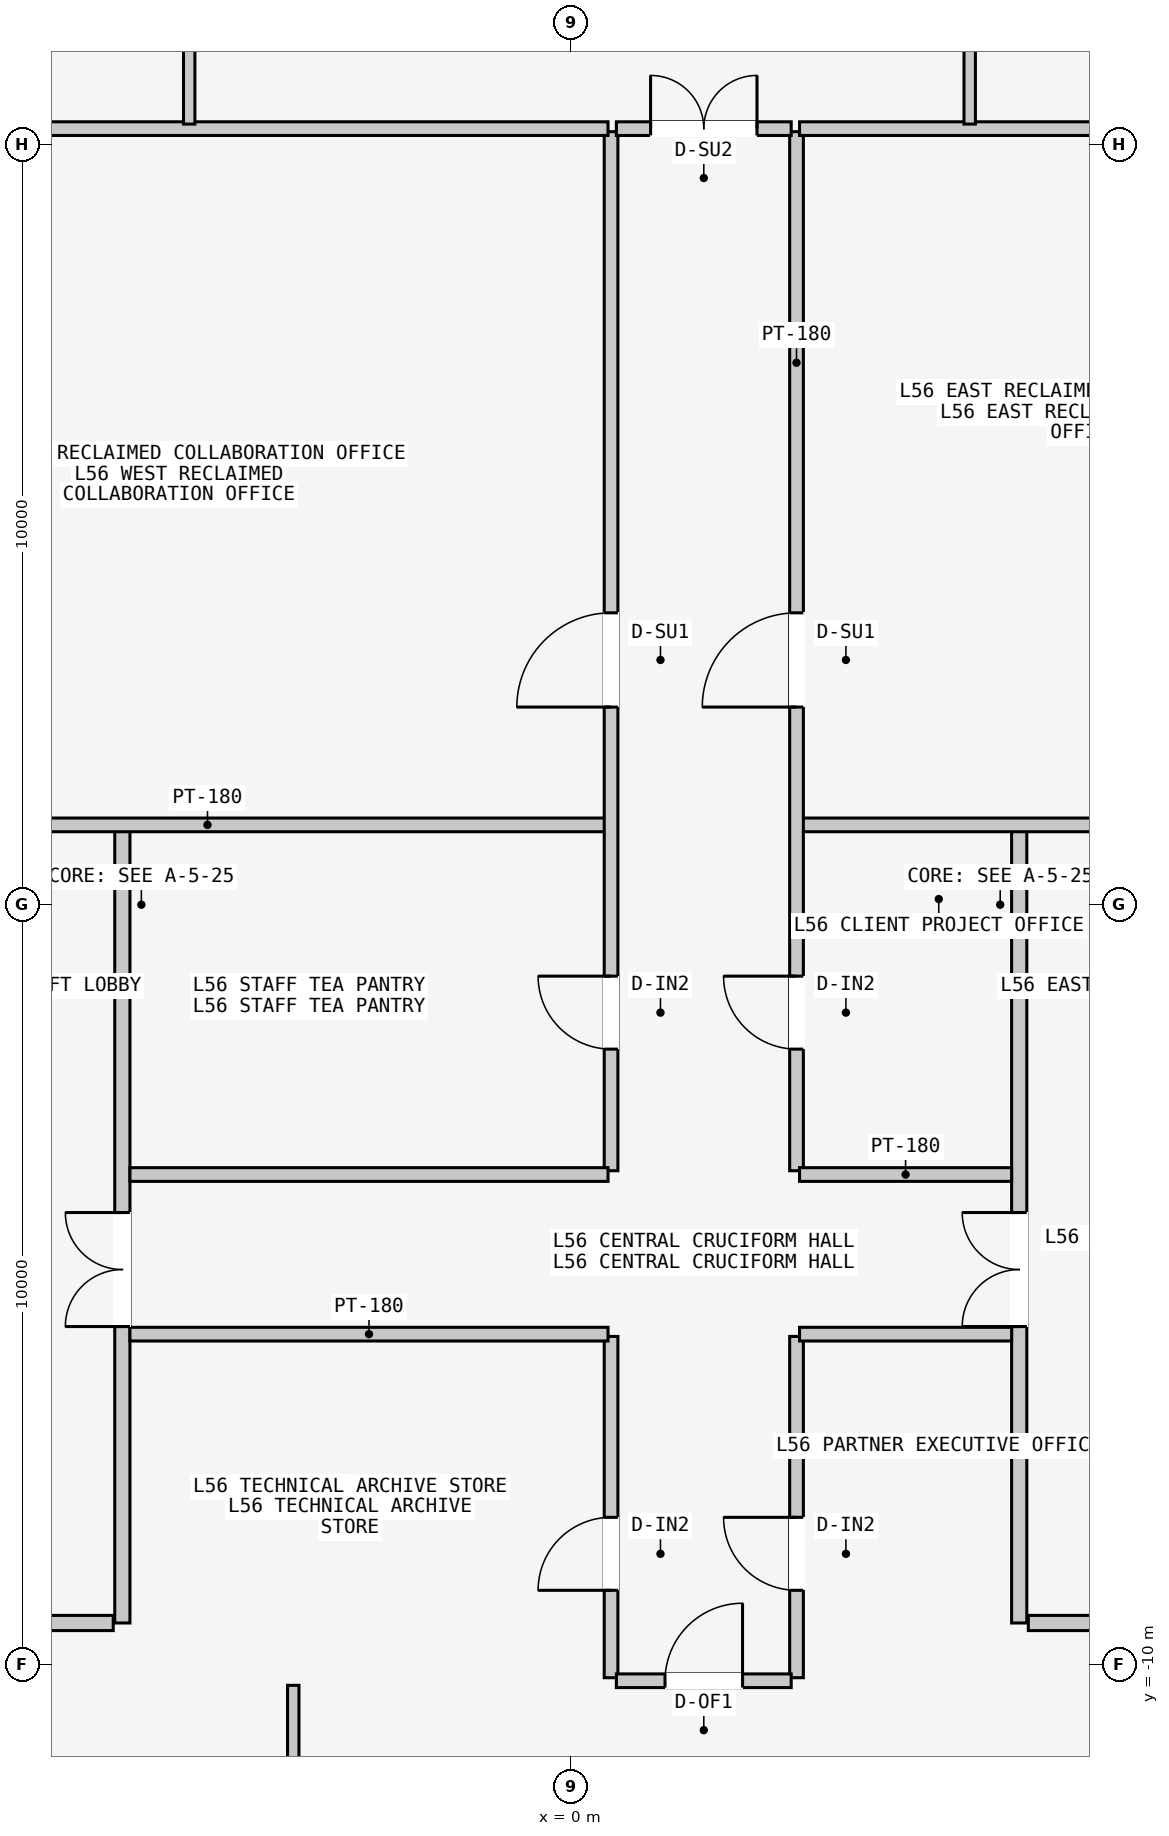
"""IFC4 building model, lengths in metres.
Left out: names, types, materials, properties, quantities, classifications, styles, units other than length and angle.
Written with IfcOpenShell. Run it as: python <this file> out.ifc"""

import sys

from ifc_helpers import new_model, si_unit, direction, frame, frame_2d, origin, place, context, subcontext, project, spatial, rectangle, extrude, element, fill, save


model = new_model("IFC4")
c1 = context("Model", 3, precision=1e-05, world=origin(), true_north=direction((0.0, 1.0)))
c2 = subcontext(c1, "Body", "Model", "MODEL_VIEW")
j1 = project(units=[si_unit("LENGTHUNIT", "METRE"), si_unit("PLANEANGLEUNIT", "RADIAN")], contexts=[c1])
p1 = place(None, origin())
s1 = spatial("IfcSite", under=j1, at=p1, CompositionType="ELEMENT")
p2 = place(p1, origin())
s2 = spatial("IfcBuilding", under=s1, at=p2, CompositionType="ELEMENT")
p3 = place(p2, frame((0.0, 0.0, 213.9)))
s3 = spatial("IfcBuildingStorey", under=s2, at=p3, CompositionType="ELEMENT", Elevation=213.9)
p4 = place(p3, frame((-5.9, -9.45, 0.0), z_axis=(0.0, 0.0, 1.0), x_axis=(0.0, 1.0, 0.0)))
e1 = element("IfcWall", 1, at=p4, inside=s3, PredefinedType="PARTITIONING", context=c2, shape_type="SweptSolid", body=[
    extrude(rectangle(XDim=10.5, YDim=0.2, at=frame_2d((5.25, 0.0))), origin(), (0.0, 0.0, 1.0), 4.3),
])
p5 = place(p4, frame((3.9, 0.0, 0.0)))
e2 = element("IfcOpeningElement", 2, at=p5, cuts=e1, PredefinedType="OPENING", context=c2, shape_type="SweptSolid", body=[
    extrude(rectangle(XDim=1.5, YDim=2.2, at=frame_2d((0.75, 1.1))), frame((0.0, 0.11, 0.0), z_axis=(0.0, -1.0, 0.0), x_axis=(1.0, 0.0, 0.0)), (0.0, 0.0, 1.0), 0.22),
])
p6 = place(p3, frame((-6.02, -9.45, 0.0), z_axis=(0.0, 0.0, 1.0), x_axis=(-1.0, 0.0, 0.0)))
e3 = element("IfcWall", 3, at=p6, inside=s3, PredefinedType="PARTITIONING", context=c2, shape_type="SweptSolid", body=[
    extrude(rectangle(XDim=1.8, YDim=0.2, at=frame_2d((0.9, 0.0))), origin(), (0.0, 0.0, 1.0), 4.3),
])
p7 = place(p3, frame((5.9, -9.45, 0.0), z_axis=(0.0, 0.0, 1.0), x_axis=(0.0, 1.0, 0.0)))
e4 = element("IfcWall", 4, at=p7, inside=s3, PredefinedType="PARTITIONING", context=c2, shape_type="SweptSolid", body=[
    extrude(rectangle(XDim=10.5, YDim=0.2, at=frame_2d((5.25, 0.0))), origin(), (0.0, 0.0, 1.0), 4.3),
])
p8 = place(p7, frame((3.9, 0.0, 0.0)))
e5 = element("IfcOpeningElement", 5, at=p8, cuts=e4, PredefinedType="OPENING", context=c2, shape_type="SweptSolid", body=[
    extrude(rectangle(XDim=1.5, YDim=2.2, at=frame_2d((0.75, 1.1))), frame((0.0, 0.11, 0.0), z_axis=(0.0, -1.0, 0.0), x_axis=(1.0, 0.0, 0.0)), (0.0, 0.0, 1.0), 0.22),
])
p9 = place(p3, frame((6.02, -9.45, 0.0), z_axis=(0.0, 0.0, 1.0), x_axis=(1.0, 0.0, 0.0)))
e6 = element("IfcWall", 6, at=p9, inside=s3, PredefinedType="PARTITIONING", context=c2, shape_type="SweptSolid", body=[
    extrude(rectangle(XDim=1.8, YDim=0.2, at=frame_2d((0.9, 0.0))), origin(), (0.0, 0.0, 1.0), 4.3),
])
p10 = place(p3, frame((-10.05, 1.05, 0.0), z_axis=(0.0, 0.0, 1.0), x_axis=(1.0, 0.0, 0.0)))
e7 = element("IfcWall", 7, at=p10, inside=s3, PredefinedType="PARTITIONING", context=c2, shape_type="SweptSolid", body=[
    extrude(rectangle(XDim=10.54, YDim=0.18, at=frame_2d((5.27, 0.0))), origin(), (0.0, 0.0, 1.0), 4.3),
])
p11 = place(p3, frame((0.53, -3.5, 0.0), z_axis=(0.0, 0.0, 1.0), x_axis=(0.0, 1.0, 0.0)))
e8 = element("IfcWall", 8, at=p11, inside=s3, PredefinedType="PARTITIONING", context=c2, shape_type="SweptSolid", body=[
    extrude(rectangle(XDim=13.67, YDim=0.18, at=frame_2d((6.835, 0.0))), origin(), (0.0, 0.0, 1.0), 4.3),
])
p12 = place(p11, frame((6.1, 0.0, 0.0)))
e9 = element("IfcOpeningElement", 9, at=p12, cuts=e8, PredefinedType="OPENING", context=c2, shape_type="SweptSolid", body=[
    extrude(rectangle(XDim=1.24, YDim=2.24, at=frame_2d((0.62, 1.12))), frame((0.0, 0.1, 0.0), z_axis=(0.0, -1.0, 0.0), x_axis=(1.0, 0.0, 0.0)), (0.0, 0.0, 1.0), 0.2),
])
p13 = place(p11, frame((1.6, 0.0, 0.0)))
e10 = element("IfcOpeningElement", 10, at=p13, cuts=e8, PredefinedType="OPENING", context=c2, shape_type="SweptSolid", body=[
    extrude(rectangle(XDim=0.96, YDim=2.18, at=frame_2d((0.48, 1.09))), frame((0.0, 0.1, 0.0), z_axis=(0.0, -1.0, 0.0), x_axis=(1.0, 0.0, 0.0)), (0.0, 0.0, 1.0), 0.2),
])
p14 = place(p3, frame((-7.5, 10.21, 0.0), z_axis=(0.0, 0.0, 1.0), x_axis=(1.0, 0.0, 0.0)))
e11 = element("IfcWall", 11, at=p14, inside=s3, PredefinedType="PARTITIONING", context=c2, shape_type="SweptSolid", body=[
    extrude(rectangle(XDim=7.99, YDim=0.18, at=frame_2d((3.995, 0.0))), origin(), (0.0, 0.0, 1.0), 4.3),
])
p15 = place(p3, frame((-5.8, -3.55, 0.0), z_axis=(0.0, 0.0, 1.0), x_axis=(1.0, 0.0, 0.0)))
e12 = element("IfcWall", 12, at=p15, inside=s3, PredefinedType="PARTITIONING", context=c2, shape_type="SweptSolid", body=[
    extrude(rectangle(XDim=6.29, YDim=0.18, at=frame_2d((3.145, 0.0))), origin(), (0.0, 0.0, 1.0), 4.3),
])
p16 = place(p3, frame((3.01, 1.05, 0.0), z_axis=(0.0, 0.0, 1.0), x_axis=(1.0, 0.0, 0.0)))
e13 = element("IfcWall", 13, at=p16, inside=s3, PredefinedType="PARTITIONING", context=c2, shape_type="SweptSolid", body=[
    extrude(rectangle(XDim=7.05, YDim=0.18, at=frame_2d((3.525, 0.0))), origin(), (0.0, 0.0, 1.0), 4.3),
])
p17 = place(p3, frame((2.97, -3.5, 0.0), z_axis=(0.0, 0.0, 1.0), x_axis=(0.0, 1.0, 0.0)))
e14 = element("IfcWall", 14, at=p17, inside=s3, PredefinedType="PARTITIONING", context=c2, shape_type="SweptSolid", body=[
    extrude(rectangle(XDim=13.67, YDim=0.18, at=frame_2d((6.835, 0.0))), origin(), (0.0, 0.0, 1.0), 4.3),
])
p18 = place(p17, frame((6.1, 0.0, 0.0)))
e15 = element("IfcOpeningElement", 15, at=p18, cuts=e14, PredefinedType="OPENING", context=c2, shape_type="SweptSolid", body=[
    extrude(rectangle(XDim=1.24, YDim=2.24, at=frame_2d((0.62, 1.12))), frame((0.0, 0.1, 0.0), z_axis=(0.0, -1.0, 0.0), x_axis=(1.0, 0.0, 0.0)), (0.0, 0.0, 1.0), 0.2),
])
p19 = place(p17, frame((1.6, 0.0, 0.0)))
e16 = element("IfcOpeningElement", 16, at=p19, cuts=e14, PredefinedType="OPENING", context=c2, shape_type="SweptSolid", body=[
    extrude(rectangle(XDim=0.96, YDim=2.18, at=frame_2d((0.48, 1.09))), frame((0.0, 0.1, 0.0), z_axis=(0.0, -1.0, 0.0), x_axis=(1.0, 0.0, 0.0)), (0.0, 0.0, 1.0), 0.2),
])
p20 = place(p3, frame((3.01, 10.21, 0.0), z_axis=(0.0, 0.0, 1.0), x_axis=(1.0, 0.0, 0.0)))
e17 = element("IfcWall", 17, at=p20, inside=s3, PredefinedType="PARTITIONING", context=c2, shape_type="SweptSolid", body=[
    extrude(rectangle(XDim=4.49, YDim=0.18, at=frame_2d((2.245, 0.0))), origin(), (0.0, 0.0, 1.0), 4.3),
])
p21 = place(p3, frame((3.01, -3.55, 0.0), z_axis=(0.0, 0.0, 1.0), x_axis=(1.0, 0.0, 0.0)))
e18 = element("IfcWall", 18, at=p21, inside=s3, PredefinedType="PARTITIONING", context=c2, shape_type="SweptSolid", body=[
    extrude(rectangle(XDim=2.79, YDim=0.18, at=frame_2d((1.395, 0.0))), origin(), (0.0, 0.0, 1.0), 4.3),
])
p22 = place(p3, frame((0.53, -10.17, 0.0), z_axis=(0.0, 0.0, 1.0), x_axis=(0.0, 1.0, 0.0)))
e19 = element("IfcWall", 19, at=p22, inside=s3, PredefinedType="PARTITIONING", context=c2, shape_type="SweptSolid", body=[
    extrude(rectangle(XDim=4.49, YDim=0.18, at=frame_2d((2.245, 0.0))), origin(), (0.0, 0.0, 1.0), 4.3),
])
p23 = place(p22, frame((1.15, 0.0, 0.0)))
e20 = element("IfcOpeningElement", 20, at=p23, cuts=e19, PredefinedType="OPENING", context=c2, shape_type="SweptSolid", body=[
    extrude(rectangle(XDim=0.96, YDim=2.18, at=frame_2d((0.48, 1.09))), frame((0.0, 0.1, 0.0), z_axis=(0.0, -1.0, 0.0), x_axis=(1.0, 0.0, 0.0)), (0.0, 0.0, 1.0), 0.2),
])
p24 = place(p3, frame((2.97, -10.17, 0.0), z_axis=(0.0, 0.0, 1.0), x_axis=(0.0, 1.0, 0.0)))
e21 = element("IfcWall", 21, at=p24, inside=s3, PredefinedType="PARTITIONING", context=c2, shape_type="SweptSolid", body=[
    extrude(rectangle(XDim=4.49, YDim=0.18, at=frame_2d((2.245, 0.0))), origin(), (0.0, 0.0, 1.0), 4.3),
])
p25 = place(p24, frame((1.15, 0.0, 0.0)))
e22 = element("IfcOpeningElement", 22, at=p25, cuts=e21, PredefinedType="OPENING", context=c2, shape_type="SweptSolid", body=[
    extrude(rectangle(XDim=0.96, YDim=2.18, at=frame_2d((0.48, 1.09))), frame((0.0, 0.1, 0.0), z_axis=(0.0, -1.0, 0.0), x_axis=(1.0, 0.0, 0.0)), (0.0, 0.0, 1.0), 0.2),
])
p26 = place(p3, frame((-5.8, -5.65, 0.0), z_axis=(0.0, 0.0, 1.0), x_axis=(1.0, 0.0, 0.0)))
e23 = element("IfcWall", 23, at=p26, inside=s3, PredefinedType="PARTITIONING", context=c2, shape_type="SweptSolid", body=[
    extrude(rectangle(XDim=6.29, YDim=0.18, at=frame_2d((3.145, 0.0))), origin(), (0.0, 0.0, 1.0), 4.3),
])
p27 = place(p3, frame((3.01, -5.65, 0.0), z_axis=(0.0, 0.0, 1.0), x_axis=(1.0, 0.0, 0.0)))
e24 = element("IfcWall", 24, at=p27, inside=s3, PredefinedType="PARTITIONING", context=c2, shape_type="SweptSolid", body=[
    extrude(rectangle(XDim=2.79, YDim=0.18, at=frame_2d((1.395, 0.0))), origin(), (0.0, 0.0, 1.0), 4.3),
])
p28 = place(p3, frame((-5.021, 10.27, 0.0), z_axis=(0.0, 0.0, 1.0), x_axis=(0.0, 1.0, 0.0)))
e25 = element("IfcWall", 25, at=p28, inside=s3, PredefinedType="PARTITIONING", context=c2, shape_type="SweptSolid", body=[
    extrude(rectangle(XDim=7.29, YDim=0.15, at=frame_2d((3.645, 0.0))), origin(), (0.0, 0.0, 1.0), 4.3),
])
p29 = place(p28, frame((1.15, 0.0, 0.0)))
e26 = element("IfcOpeningElement", 26, at=p29, cuts=e25, PredefinedType="OPENING", context=c2, shape_type="SweptSolid", body=[
    extrude(rectangle(XDim=0.96, YDim=2.18, at=frame_2d((0.48, 1.09))), frame((0.0, 0.085, 0.0), z_axis=(0.0, -1.0, 0.0), x_axis=(1.0, 0.0, 0.0)), (0.0, 0.0, 1.0), 0.17),
])
p30 = place(p3, frame((5.249, 10.27, 0.0), z_axis=(0.0, 0.0, 1.0), x_axis=(0.0, 1.0, 0.0)))
e27 = element("IfcWall", 27, at=p30, inside=s3, PredefinedType="PARTITIONING", context=c2, shape_type="SweptSolid", body=[
    extrude(rectangle(XDim=7.29, YDim=0.15, at=frame_2d((3.645, 0.0))), origin(), (0.0, 0.0, 1.0), 4.3),
])
p31 = place(p30, frame((1.15, 0.0, 0.0)))
e28 = element("IfcOpeningElement", 28, at=p31, cuts=e27, PredefinedType="OPENING", context=c2, shape_type="SweptSolid", body=[
    extrude(rectangle(XDim=0.96, YDim=2.18, at=frame_2d((0.48, 1.09))), frame((0.0, 0.085, 0.0), z_axis=(0.0, -1.0, 0.0), x_axis=(1.0, 0.0, 0.0)), (0.0, 0.0, 1.0), 0.17),
])
p32 = place(p3, frame((0.6, 10.21, 0.0), z_axis=(0.0, 0.0, 1.0), x_axis=(1.0, 0.0, 0.0)))
e29 = element("IfcWall", 29, at=p32, inside=s3, PredefinedType="PARTITIONING", context=c2, shape_type="SweptSolid", body=[
    extrude(rectangle(XDim=2.3, YDim=0.18, at=frame_2d((1.15, 0.0))), origin(), (0.0, 0.0, 1.0), 4.3),
])
p33 = place(p32, frame((0.45, 0.0, 0.0)))
e30 = element("IfcOpeningElement", 30, at=p33, cuts=e29, PredefinedType="OPENING", context=c2, shape_type="SweptSolid", body=[
    extrude(rectangle(XDim=1.4, YDim=2.2, at=frame_2d((0.7, 1.1))), frame((0.0, 0.1, 0.0), z_axis=(0.0, -1.0, 0.0), x_axis=(1.0, 0.0, 0.0)), (0.0, 0.0, 1.0), 0.2),
])
p34 = place(p3, frame((-3.651, -17.56, 0.0), z_axis=(0.0, 0.0, 1.0), x_axis=(0.0, 1.0, 0.0)))
e31 = element("IfcWall", 31, at=p34, inside=s3, PredefinedType="PARTITIONING", context=c2, shape_type="SweptSolid", body=[
    extrude(rectangle(XDim=7.29, YDim=0.15, at=frame_2d((3.645, 0.0))), origin(), (0.0, 0.0, 1.0), 4.3),
])
p35 = place(p34, frame((1.05, 0.0, 0.0)))
e32 = element("IfcOpeningElement", 32, at=p35, cuts=e31, PredefinedType="OPENING", context=c2, shape_type="SweptSolid", body=[
    extrude(rectangle(XDim=0.96, YDim=2.18, at=frame_2d((0.48, 1.09))), frame((0.0, 0.085, 0.0), z_axis=(0.0, -1.0, 0.0), x_axis=(1.0, 0.0, 0.0)), (0.0, 0.0, 1.0), 0.17),
])
p36 = place(p3, frame((0.6, -10.21, 0.0), z_axis=(0.0, 0.0, 1.0), x_axis=(1.0, 0.0, 0.0)))
e33 = element("IfcWall", 33, at=p36, inside=s3, PredefinedType="PARTITIONING", context=c2, shape_type="SweptSolid", body=[
    extrude(rectangle(XDim=2.3, YDim=0.18, at=frame_2d((1.15, 0.0))), origin(), (0.0, 0.0, 1.0), 4.3),
])
p37 = place(p36, frame((0.64, 0.0, 0.0)))
e34 = element("IfcOpeningElement", 34, at=p37, cuts=e33, PredefinedType="OPENING", context=c2, shape_type="SweptSolid", body=[
    extrude(rectangle(XDim=1.02, YDim=2.2, at=frame_2d((0.51, 1.1))), frame((0.0, 0.1, 0.0), z_axis=(0.0, -1.0, 0.0), x_axis=(1.0, 0.0, 0.0)), (0.0, 0.0, 1.0), 0.2),
])
p38 = place(p5, origin())
e35 = element("IfcDoor", 35, at=p38, inside=s3, OperationType="DOUBLE_DOOR_SINGLE_SWING", PredefinedType="DOOR", context=c2, shape_type="SweptSolid", body=[
    extrude(rectangle(XDim=1.5, YDim=2.2, at=frame_2d((0.75, 1.1))), frame((0.0, 0.025, 0.0), z_axis=(0.0, -1.0, 0.0), x_axis=(1.0, 0.0, 0.0)), (0.0, 0.0, 1.0), 0.05),
])
fill(e2, e35)
p39 = place(p8, origin())
e36 = element("IfcDoor", 36, at=p39, inside=s3, OperationType="DOUBLE_DOOR_SINGLE_SWING", PredefinedType="DOOR", context=c2, shape_type="SweptSolid", body=[
    extrude(rectangle(XDim=1.5, YDim=2.2, at=frame_2d((0.75, 1.1))), frame((0.0, 0.025, 0.0), z_axis=(0.0, -1.0, 0.0), x_axis=(1.0, 0.0, 0.0)), (0.0, 0.0, 1.0), 0.05),
])
fill(e5, e36)
p40 = place(p12, origin())
e37 = element("IfcDoor", 37, at=p40, inside=s3, OperationType="SINGLE_SWING_LEFT", PredefinedType="DOOR", context=c2, shape_type="SweptSolid", body=[
    extrude(rectangle(XDim=1.24, YDim=2.24, at=frame_2d((0.62, 1.12))), frame((0.0, 0.025, 0.0), z_axis=(0.0, -1.0, 0.0), x_axis=(1.0, 0.0, 0.0)), (0.0, 0.0, 1.0), 0.05),
])
fill(e9, e37)
p41 = place(p13, origin())
e38 = element("IfcDoor", 38, at=p41, inside=s3, OperationType="SINGLE_SWING_RIGHT", PredefinedType="DOOR", context=c2, shape_type="SweptSolid", body=[
    extrude(rectangle(XDim=0.96, YDim=2.18, at=frame_2d((0.48, 1.09))), frame((0.0, 0.025, 0.0), z_axis=(0.0, -1.0, 0.0), x_axis=(1.0, 0.0, 0.0)), (0.0, 0.0, 1.0), 0.05),
])
fill(e10, e38)
p42 = place(p18, origin())
e39 = element("IfcDoor", 39, at=p42, inside=s3, OperationType="SINGLE_SWING_LEFT", PredefinedType="DOOR", context=c2, shape_type="SweptSolid", body=[
    extrude(rectangle(XDim=1.24, YDim=2.24, at=frame_2d((0.62, 1.12))), frame((0.0, 0.025, 0.0), z_axis=(0.0, -1.0, 0.0), x_axis=(1.0, 0.0, 0.0)), (0.0, 0.0, 1.0), 0.05),
])
fill(e15, e39)
p43 = place(p19, origin())
e40 = element("IfcDoor", 40, at=p43, inside=s3, OperationType="SINGLE_SWING_RIGHT", PredefinedType="DOOR", context=c2, shape_type="SweptSolid", body=[
    extrude(rectangle(XDim=0.96, YDim=2.18, at=frame_2d((0.48, 1.09))), frame((0.0, 0.025, 0.0), z_axis=(0.0, -1.0, 0.0), x_axis=(1.0, 0.0, 0.0)), (0.0, 0.0, 1.0), 0.05),
])
fill(e16, e40)
p44 = place(p23, origin())
e41 = element("IfcDoor", 41, at=p44, inside=s3, OperationType="SINGLE_SWING_LEFT", PredefinedType="DOOR", context=c2, shape_type="SweptSolid", body=[
    extrude(rectangle(XDim=0.96, YDim=2.18, at=frame_2d((0.48, 1.09))), frame((0.0, 0.025, 0.0), z_axis=(0.0, -1.0, 0.0), x_axis=(1.0, 0.0, 0.0)), (0.0, 0.0, 1.0), 0.05),
])
fill(e20, e41)
p45 = place(p25, origin())
e42 = element("IfcDoor", 42, at=p45, inside=s3, OperationType="SINGLE_SWING_RIGHT", PredefinedType="DOOR", context=c2, shape_type="SweptSolid", body=[
    extrude(rectangle(XDim=0.96, YDim=2.18, at=frame_2d((0.48, 1.09))), frame((0.0, 0.025, 0.0), z_axis=(0.0, -1.0, 0.0), x_axis=(1.0, 0.0, 0.0)), (0.0, 0.0, 1.0), 0.05),
])
fill(e22, e42)
p46 = place(p33, origin())
e43 = element("IfcDoor", 43, at=p46, inside=s3, OperationType="DOUBLE_DOOR_SINGLE_SWING", PredefinedType="DOOR", context=c2, shape_type="SweptSolid", body=[
    extrude(rectangle(XDim=1.4, YDim=2.2, at=frame_2d((0.7, 1.1))), frame((0.0, 0.025, 0.0), z_axis=(0.0, -1.0, 0.0), x_axis=(1.0, 0.0, 0.0)), (0.0, 0.0, 1.0), 0.05),
])
fill(e30, e43)
p47 = place(p37, origin())
e44 = element("IfcDoor", 44, at=p47, inside=s3, OperationType="SINGLE_SWING_RIGHT", PredefinedType="DOOR", context=c2, shape_type="SweptSolid", body=[
    extrude(rectangle(XDim=1.02, YDim=2.2, at=frame_2d((0.51, 1.1))), frame((0.0, 0.025, 0.0), z_axis=(0.0, -1.0, 0.0), x_axis=(1.0, 0.0, 0.0)), (0.0, 0.0, 1.0), 0.05),
])
fill(e34, e44)
save(model, sys.argv[1])
